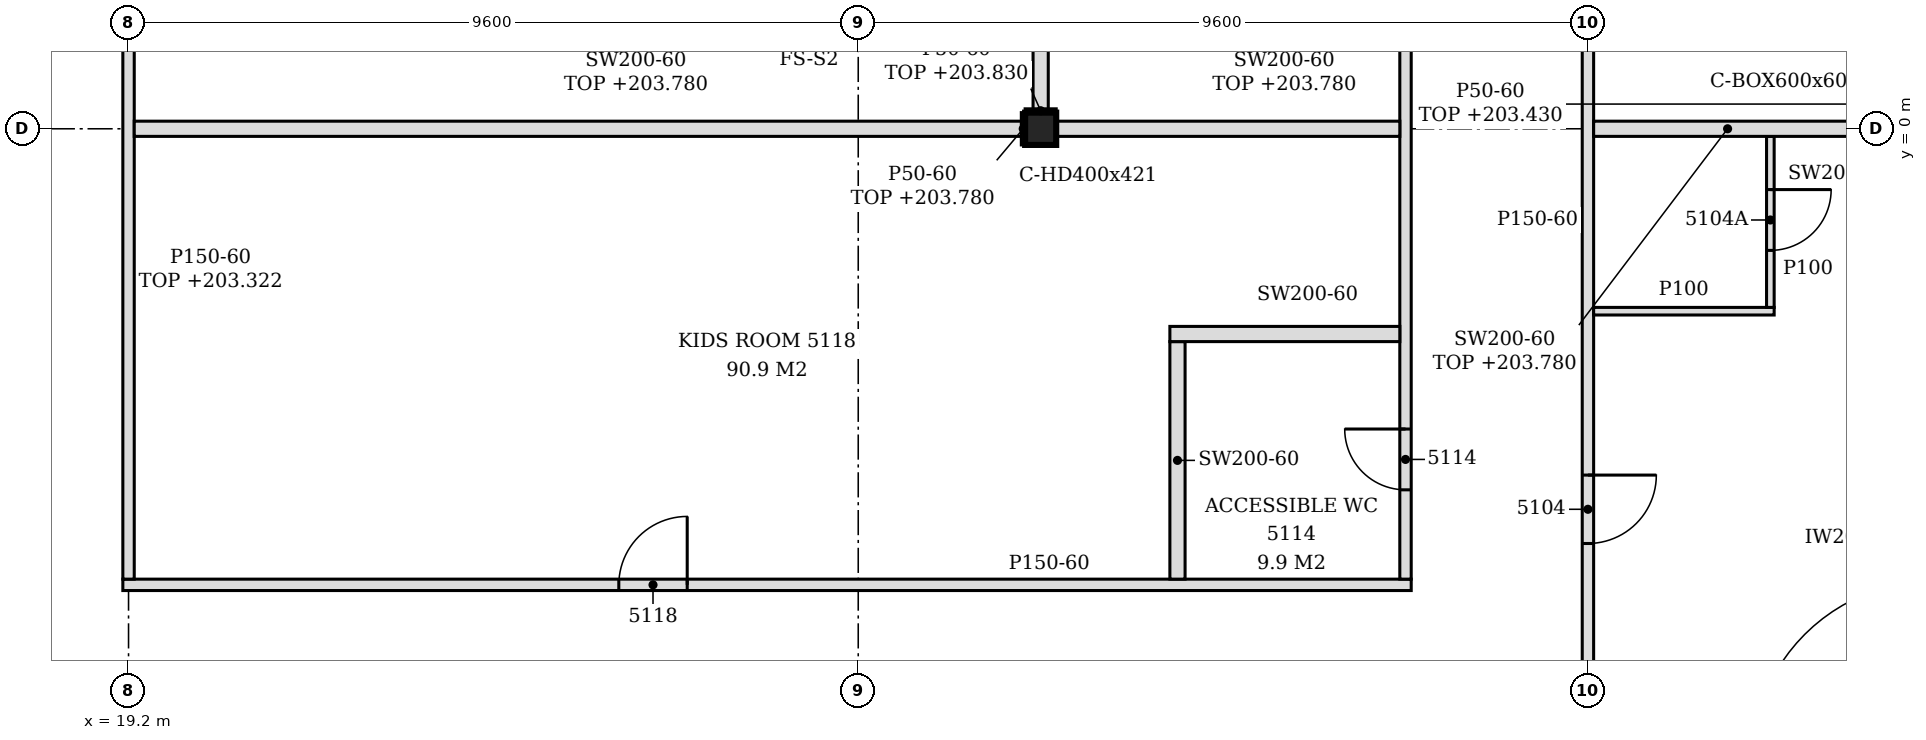
"""IFC4 building model, lengths in metres.
Left out: names, types, materials, properties, quantities, classifications, styles, units other than length and angle.
Written with IfcOpenShell. Run it as: python <this file> out.ifc"""

import sys

from ifc_helpers import new_model, si_unit, direction, frame, frame_2d, origin, origin_2d, place, context, subcontext, project, spatial, polyline, rectangle, i_section, outline, extrude, element, fill, save


model = new_model("IFC4")
c1 = context("Model", 3, precision=1e-05, world=origin(), true_north=direction((0.0, 1.0)))
c2 = subcontext(c1, "Body", "Model", "MODEL_VIEW")
j1 = project(units=[si_unit("LENGTHUNIT", "METRE"), si_unit("PLANEANGLEUNIT", "RADIAN")], contexts=[c1])
p1 = place(None, origin())
s1 = spatial("IfcSite", under=j1, at=p1, CompositionType="ELEMENT")
p2 = place(p1, origin())
s2 = spatial("IfcBuilding", under=s1, at=p2, CompositionType="ELEMENT")
p3 = place(p2, frame((0.0, 0.0, 201.0)))
s3 = spatial("IfcBuildingStorey", under=s2, at=p3, CompositionType="ELEMENT", Elevation=201.0)
p4 = place(p3, frame((31.2, 0.0, -0.15), z_axis=(0.0, 0.0, 1.0), x_axis=(1.0, 0.0, 0.0)))
e1 = element("IfcColumn", 1, at=p4, inside=s3, PredefinedType="COLUMN", context=c2, shape_type="SweptSolid", body=[
    extrude(i_section(OverallWidth=0.409, OverallDepth=0.425, WebThickness=0.033, FlangeThickness=0.052, FilletRadius=0.015, at=origin_2d()), origin(), (0.0, 0.0, 1.0), 3.5),
])
p5 = place(p3, frame((38.4, -7.431, 0.0), z_axis=(0.0, 0.0, 1.0), x_axis=(0.0, 1.0, 0.0)))
e2 = element("IfcWall", 2, at=p5, inside=s3, PredefinedType="PARTITIONING", context=c2, shape_type="SweptSolid", body=[
    extrude(outline(polyline([(0.0, 0.0), (15.149, 0.0), (15.149, 3.35), (12.336, 3.35), (12.334, 2.78), (12.126, 2.78), (12.124, 3.35), (7.536, 3.35), (7.534, 2.78), (7.326, 2.78), (7.324, 3.35), (2.736, 3.35), (2.734, 2.78), (2.526, 2.78), (2.524, 3.35), (0.0, 3.35), (0.0, 0.0)])), frame((0.0, 0.075, 0.0), z_axis=(0.0, -1.0, 0.0), x_axis=(1.0, 0.0, 0.0)), (0.0, 0.0, 1.0), 0.15),
])
p6 = place(p5, frame((1.975, 0.0, 0.0)))
e3 = element("IfcOpeningElement", 3, at=p6, cuts=e2, PredefinedType="OPENING", context=c2, shape_type="SweptSolid", body=[
    extrude(rectangle(XDim=0.9, YDim=2.1, at=frame_2d((0.45, 1.05))), frame((0.0, 0.085, 0.0), z_axis=(0.0, -1.0, 0.0), x_axis=(1.0, 0.0, 0.0)), (0.0, 0.0, 1.0), 0.17),
])
p7 = place(p5, frame((9.587, 0.0, 0.0)))
e4 = element("IfcOpeningElement", 4, at=p7, cuts=e2, PredefinedType="OPENING", context=c2, shape_type="SweptSolid", body=[
    extrude(rectangle(XDim=0.9, YDim=2.1, at=frame_2d((0.45, 1.05))), frame((0.0, 0.085, 0.0), z_axis=(0.0, -1.0, 0.0), x_axis=(1.0, 0.0, 0.0)), (0.0, 0.0, 1.0), 0.17),
])
p8 = place(p3, frame((19.125, -6.0, 0.0), z_axis=(0.0, 0.0, 1.0), x_axis=(1.0, 0.0, 0.0)))
e5 = element("IfcWall", 5, at=p8, inside=s3, PredefinedType="PARTITIONING", context=c2, shape_type="SweptSolid", body=[
    extrude(outline(polyline([(0.0, 0.0), (16.95, 0.0), (16.95, 3.35), (12.225, 3.35), (12.223, 2.83), (11.925, 2.83), (11.923, 3.35), (0.226, 3.35), (0.224, 2.322), (0.0, 2.322), (0.0, 0.0)])), frame((0.0, 0.075, 0.0), z_axis=(0.0, -1.0, 0.0), x_axis=(1.0, 0.0, 0.0)), (0.0, 0.0, 1.0), 0.15),
])
p9 = place(p8, frame((6.525, 0.0, 0.0)))
e6 = element("IfcOpeningElement", 6, at=p9, cuts=e5, PredefinedType="OPENING", context=c2, shape_type="SweptSolid", body=[
    extrude(rectangle(XDim=0.9, YDim=2.1, at=frame_2d((0.45, 1.05))), frame((0.0, 0.085, 0.0), z_axis=(0.0, -1.0, 0.0), x_axis=(1.0, 0.0, 0.0)), (0.0, 0.0, 1.0), 0.17),
])
p10 = place(p3, frame((19.2, -5.925, 0.0), z_axis=(0.0, 0.0, 1.0), x_axis=(0.0, 1.0, 0.0)))
e7 = element("IfcWall", 7, at=p10, inside=s3, PredefinedType="PARTITIONING", context=c2, shape_type="SweptSolid", body=[
    extrude(rectangle(XDim=8.129, YDim=0.15, at=frame_2d((4.064, 0.0))), origin(), (0.0, 0.0, 1.0), 2.322),
])
p11 = place(p3, frame((33.0, -5.925, 0.0), z_axis=(0.0, 0.0, 1.0), x_axis=(0.0, 1.0, 0.0)))
e8 = element("IfcWall", 8, at=p11, inside=s3, PredefinedType="PARTITIONING", context=c2, shape_type="SweptSolid", body=[
    extrude(outline(polyline([(0.0, 0.0), (3.125, 0.0), (3.125, 3.35), (1.23, 3.35), (1.228, 2.78), (1.02, 2.78), (1.018, 3.35), (0.0, 3.35), (0.0, 0.0)])), frame((0.0, 0.1, 0.0), z_axis=(0.0, -1.0, 0.0), x_axis=(1.0, 0.0, 0.0)), (0.0, 0.0, 1.0), 0.2),
])
p12 = place(p3, frame((36.0, -5.925, 0.0), z_axis=(0.0, 0.0, 1.0), x_axis=(0.0, 1.0, 0.0)))
e9 = element("IfcWall", 9, at=p12, inside=s3, PredefinedType="PARTITIONING", context=c2, shape_type="SweptSolid", body=[
    extrude(outline(polyline([(0.0, 0.0), (12.649, 0.0), (12.649, 3.35), (10.83, 3.35), (10.828, 2.78), (10.62, 2.78), (10.618, 3.35), (6.03, 3.35), (6.028, 2.78), (5.82, 2.78), (5.818, 3.35), (1.23, 3.35), (1.228, 2.78), (1.02, 2.78), (1.018, 3.35), (0.0, 3.35), (0.0, 0.0)])), frame((0.0, 0.075, 0.0), z_axis=(0.0, -1.0, 0.0), x_axis=(1.0, 0.0, 0.0)), (0.0, 0.0, 1.0), 0.15),
])
p13 = place(p12, frame((1.175, 0.0, 0.0)))
e10 = element("IfcOpeningElement", 10, at=p13, cuts=e9, PredefinedType="OPENING", context=c2, shape_type="SweptSolid", body=[
    extrude(rectangle(XDim=0.8, YDim=2.1, at=frame_2d((0.4, 1.05))), frame((0.0, 0.085, 0.0), z_axis=(0.0, -1.0, 0.0), x_axis=(1.0, 0.0, 0.0)), (0.0, 0.0, 1.0), 0.17),
])
p14 = place(p3, frame((32.9, -2.7, 0.0), z_axis=(0.0, 0.0, 1.0), x_axis=(1.0, 0.0, 0.0)))
e11 = element("IfcWall", 11, at=p14, inside=s3, PredefinedType="PARTITIONING", context=c2, shape_type="SweptSolid", body=[
    extrude(rectangle(XDim=3.025, YDim=0.2, at=frame_2d((1.513, 0.0))), origin(), (0.0, 0.0, 1.0), 3.35),
])
p15 = place(p3, frame((38.475, -2.4, 0.0), z_axis=(0.0, 0.0, 1.0), x_axis=(1.0, 0.0, 0.0)))
e12 = element("IfcWall", 12, at=p15, inside=s3, PredefinedType="PARTITIONING", context=c2, shape_type="SweptSolid", body=[
    extrude(rectangle(XDim=2.375, YDim=0.1, at=frame_2d((1.188, 0.0))), origin(), (0.0, 0.0, 1.0), 3.35),
])
p16 = place(p3, frame((40.8, -2.35, 0.0), z_axis=(0.0, 0.0, 1.0), x_axis=(0.0, 1.0, 0.0)))
e13 = element("IfcWall", 13, at=p16, inside=s3, PredefinedType="PARTITIONING", context=c2, shape_type="SweptSolid", body=[
    extrude(outline(polyline([(0.0, 0.0), (2.25, 0.0), (2.25, 2.78), (2.245, 2.78), (2.243, 3.35), (0.0, 3.35), (0.0, 0.0)])), frame((0.0, 0.05, 0.0), z_axis=(0.0, -1.0, 0.0), x_axis=(1.0, 0.0, 0.0)), (0.0, 0.0, 1.0), 0.1),
])
p17 = place(p16, frame((0.75, 0.0, 0.0)))
e14 = element("IfcOpeningElement", 14, at=p17, cuts=e13, PredefinedType="OPENING", context=c2, shape_type="SweptSolid", body=[
    extrude(rectangle(XDim=0.8, YDim=2.1, at=frame_2d((0.4, 1.05))), frame((0.0, 0.06, 0.0), z_axis=(0.0, -1.0, 0.0), x_axis=(1.0, 0.0, 0.0)), (0.0, 0.0, 1.0), 0.12),
])
p18 = place(p3, frame((19.275, 0.0, 0.0), z_axis=(0.0, 0.0, 1.0), x_axis=(1.0, 0.0, 0.0)))
e15 = element("IfcWall", 15, at=p18, inside=s3, PredefinedType="PARTITIONING", context=c2, shape_type="SweptSolid", body=[
    extrude(outline(polyline([(0.0, 0.0), (11.721, 0.0), (11.72, 2.78), (0.076, 2.78), (0.074, 2.322), (0.0, 2.322), (0.0, 0.0)])), frame((0.0, 0.1, 0.0), z_axis=(0.0, -1.0, 0.0), x_axis=(1.0, 0.0, 0.0)), (0.0, 0.0, 1.0), 0.2),
])
p19 = place(p3, frame((31.405, 0.0, 0.0), z_axis=(0.0, 0.0, 1.0), x_axis=(1.0, 0.0, 0.0)))
e16 = element("IfcWall", 16, at=p19, inside=s3, PredefinedType="PARTITIONING", context=c2, shape_type="SweptSolid", body=[
    extrude(rectangle(XDim=4.521, YDim=0.2, at=frame_2d((2.26, 0.0))), origin(), (0.0, 0.0, 1.0), 2.78),
])
p20 = place(p3, frame((38.475, 0.0, 0.0), z_axis=(0.0, 0.0, 1.0), x_axis=(1.0, 0.0, 0.0)))
e17 = element("IfcWall", 17, at=p20, inside=s3, PredefinedType="PARTITIONING", context=c2, shape_type="SweptSolid", body=[
    extrude(outline(polyline([(0.0, 0.0), (3.525, 0.0), (3.525, 2.43), (3.375, 2.43), (3.373, 2.78), (0.0, 2.78), (0.0, 0.0)])), frame((0.0, 0.1, 0.0), z_axis=(0.0, -1.0, 0.0), x_axis=(1.0, 0.0, 0.0)), (0.0, 0.0, 1.0), 0.2),
])
p21 = place(p3, frame((31.2, 0.212, 0.0), z_axis=(0.0, 0.0, 1.0), x_axis=(0.0, 1.0, 0.0)))
e18 = element("IfcWall", 18, at=p21, inside=s3, PredefinedType="PARTITIONING", context=c2, shape_type="SweptSolid", body=[
    extrude(rectangle(XDim=9.175, YDim=0.2, at=frame_2d((4.587, 0.0))), origin(), (0.0, 0.0, 1.0), 2.83),
])
p22 = place(p3, frame((30.996, 0.238, 0.0), z_axis=(0.0, 0.0, 1.0), x_axis=(1.0, 0.0, 0.0)))
e19 = element("IfcWall", 19, at=p22, inside=s3, PredefinedType="PARTITIONING", context=c2, shape_type="SweptSolid", body=[
    extrude(rectangle(XDim=0.409, YDim=0.05, at=frame_2d((0.205, 0.0))), origin(), (0.0, 0.0, 1.0), 2.83),
])
p23 = place(p3, frame((30.97, -0.212, 0.0), z_axis=(0.0, 0.0, 1.0), x_axis=(0.0, 1.0, 0.0)))
e20 = element("IfcWall", 20, at=p23, inside=s3, PredefinedType="PARTITIONING", context=c2, shape_type="SweptSolid", body=[
    extrude(rectangle(XDim=0.425, YDim=0.05, at=frame_2d((0.212, 0.0))), origin(), (0.0, 0.0, 1.0), 2.78),
])
p24 = place(p6, frame((0.9, 0.0, 0.0), z_axis=(0.0, 0.0, 1.0), x_axis=(-1.0, 0.0, 0.0)))
e21 = element("IfcDoor", 21, at=p24, inside=s3, OperationType="SINGLE_SWING_LEFT", PredefinedType="DOOR", context=c2, shape_type="SweptSolid", body=[
    extrude(rectangle(XDim=0.9, YDim=2.1, at=frame_2d((0.45, 1.05))), frame((0.0, 0.025, 0.0), z_axis=(0.0, -1.0, 0.0), x_axis=(1.0, 0.0, 0.0)), (0.0, 0.0, 1.0), 0.05),
])
fill(e3, e21)
p25 = place(p17, frame((0.8, 0.0, 0.0), z_axis=(0.0, 0.0, 1.0), x_axis=(-1.0, 0.0, 0.0)))
e22 = element("IfcDoor", 22, at=p25, inside=s3, OperationType="SINGLE_SWING_LEFT", PredefinedType="DOOR", context=c2, shape_type="SweptSolid", body=[
    extrude(rectangle(XDim=0.8, YDim=2.1, at=frame_2d((0.4, 1.05))), frame((0.0, 0.025, 0.0), z_axis=(0.0, -1.0, 0.0), x_axis=(1.0, 0.0, 0.0)), (0.0, 0.0, 1.0), 0.05),
])
fill(e14, e22)
p26 = place(p13, origin())
e23 = element("IfcDoor", 23, at=p26, inside=s3, OperationType="SINGLE_SWING_RIGHT", PredefinedType="DOOR", context=c2, shape_type="SweptSolid", body=[
    extrude(rectangle(XDim=0.8, YDim=2.1, at=frame_2d((0.4, 1.05))), frame((0.0, 0.025, 0.0), z_axis=(0.0, -1.0, 0.0), x_axis=(1.0, 0.0, 0.0)), (0.0, 0.0, 1.0), 0.05),
])
fill(e10, e23)
p27 = place(p9, origin())
e24 = element("IfcDoor", 24, at=p27, inside=s3, OperationType="SINGLE_SWING_RIGHT", PredefinedType="DOOR", context=c2, shape_type="SweptSolid", body=[
    extrude(rectangle(XDim=0.9, YDim=2.1, at=frame_2d((0.45, 1.05))), frame((0.0, 0.025, 0.0), z_axis=(0.0, -1.0, 0.0), x_axis=(1.0, 0.0, 0.0)), (0.0, 0.0, 1.0), 0.05),
])
fill(e6, e24)
save(model, sys.argv[1])
